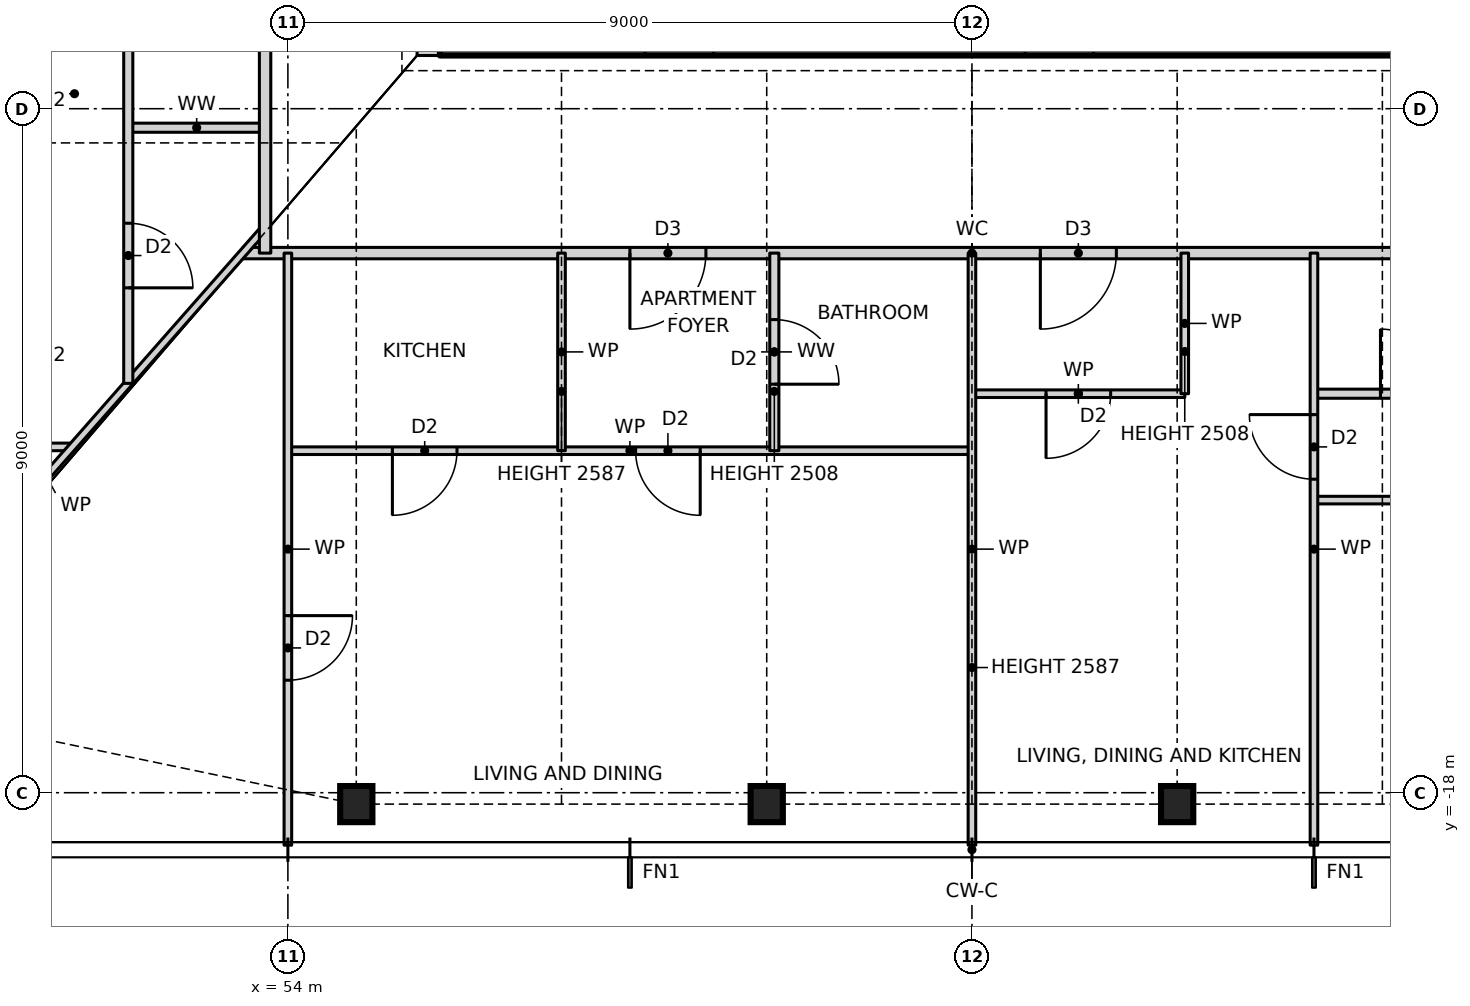
"""IFC4 building model, lengths in metres.
Left out: names, types, materials, properties, quantities, classifications, styles, units other than length and angle.
Written with IfcOpenShell. Run it as: python <this file> out.ifc"""

import sys

from ifc_helpers import new_model, si_unit, direction, frame, frame_2d, origin, origin_2d, place, context, subcontext, project, spatial, rectangle, i_section, extrude, element, fill, save


model = new_model("IFC4")
c1 = context("Model", 3, precision=1e-05, world=origin(), true_north=direction((0.0, 1.0)))
c2 = subcontext(c1, "Body", "Model", "MODEL_VIEW")
j1 = project(units=[si_unit("LENGTHUNIT", "METRE"), si_unit("PLANEANGLEUNIT", "RADIAN")], contexts=[c1])
p1 = place(None, origin())
s1 = spatial("IfcSite", under=j1, at=p1, CompositionType="ELEMENT")
p2 = place(p1, origin())
s2 = spatial("IfcBuilding", under=s1, at=p2, CompositionType="ELEMENT")
p3 = place(p2, frame((0.0, 0.0, 57.0)))
s3 = spatial("IfcBuildingStorey", under=s2, at=p3, CompositionType="ELEMENT", Elevation=57.0)
for number, where, z_axis, x_axis in (
    (1, (54.9, -18.15, 0.0), (0.0, 0.0, 1.0), (1.0, 0.0, 0.0)),
    (2, (60.3, -18.15, 0.0), (0.0, 0.0, 1.0), (1.0, 0.0, 0.0)),
    (3, (65.7, -18.15, 0.0), (0.0, 0.0, 1.0), (1.0, 0.0, 0.0)),
):
    element("IfcColumn", number, at=place(p3, frame(where, z_axis=z_axis, x_axis=x_axis)), inside=s3, PredefinedType="COLUMN", context=c2, shape_type="SweptSolid", body=[
        extrude(i_section(OverallWidth=0.424, OverallDepth=0.475, WebThickness=0.048, FlangeThickness=0.077, at=origin_2d()), origin(), (0.0, 0.0, 1.0), 3.5),
    ])
p4 = place(p3, frame((55.7, -8.15, 0.0), z_axis=(0.0, 0.0, 1.0), x_axis=(1.0, 0.0, 0.0)))
e4 = element("IfcWall", 4, at=p4, inside=s3, PredefinedType="SOLIDWALL", context=c2, shape_type="SweptSolid", body=[
    extrude(rectangle(XDim=0.3, YDim=0.3, at=frame_2d((0.15, 0.0))), origin(), (0.0, 0.0, 1.0), 3.5),
])
p5 = place(p3, frame((56.0, -8.0, 0.0), z_axis=(0.0, 0.0, 1.0), x_axis=(1.0, 0.0, 0.0)))
e5 = element("IfcWall", 5, at=p5, inside=s3, PredefinedType="SHEAR", context=c2, shape_type="SweptSolid", body=[
    extrude(rectangle(XDim=14.0, YDim=0.6, at=frame_2d((7.0, 0.0))), origin(), (0.0, 0.0, 1.0), 3.5),
])
p6 = place(p5, frame((2.7, 0.0, 0.0)))
e6 = element("IfcOpeningElement", 6, at=p6, cuts=e5, PredefinedType="OPENING", context=c2, shape_type="SweptSolid", body=[
    extrude(rectangle(XDim=0.9, YDim=2.1, at=frame_2d((0.45, 1.05))), frame((0.0, 0.31, 0.0), z_axis=(0.0, -1.0, 0.0), x_axis=(1.0, 0.0, 0.0)), (0.0, 0.0, 1.0), 0.62),
])
p7 = place(p5, frame((7.7, 0.0, 0.0)))
e7 = element("IfcOpeningElement", 7, at=p7, cuts=e5, PredefinedType="OPENING", context=c2, shape_type="SweptSolid", body=[
    extrude(rectangle(XDim=0.9, YDim=2.1, at=frame_2d((0.45, 1.05))), frame((0.0, 0.31, 0.0), z_axis=(0.0, -1.0, 0.0), x_axis=(1.0, 0.0, 0.0)), (0.0, 0.0, 1.0), 0.62),
])
p8 = place(p3, frame((67.5, -14.15, 0.0), z_axis=(0.0, 0.0, 1.0), x_axis=(1.0, 0.0, 0.0)))
e8 = element("IfcWall", 8, at=p8, inside=s3, PredefinedType="PARTITIONING", context=c2, shape_type="SweptSolid", body=[
    extrude(rectangle(XDim=6.7, YDim=0.1, at=frame_2d((3.35, 0.0))), origin(), (0.0, 0.0, 1.0), 3.27),
])
p9 = place(p8, frame((1.825, 0.0, 0.0)))
e9 = element("IfcOpeningElement", 9, at=p9, cuts=e8, PredefinedType="OPENING", context=c2, shape_type="SweptSolid", body=[
    extrude(rectangle(XDim=0.85, YDim=2.1, at=frame_2d((0.425, 1.05))), frame((0.0, 0.06, 0.0), z_axis=(0.0, -1.0, 0.0), x_axis=(1.0, 0.0, 0.0)), (0.0, 0.0, 1.0), 0.12),
])
p10 = place(p8, frame((5.175, 0.0, 0.0)))
e10 = element("IfcOpeningElement", 10, at=p10, cuts=e8, PredefinedType="OPENING", context=c2, shape_type="SweptSolid", body=[
    extrude(rectangle(XDim=0.85, YDim=2.1, at=frame_2d((0.425, 1.05))), frame((0.0, 0.06, 0.0), z_axis=(0.0, -1.0, 0.0), x_axis=(1.0, 0.0, 0.0)), (0.0, 0.0, 1.0), 0.12),
])
p11 = place(p3, frame((54.0, -13.5, 0.0), z_axis=(0.0, 0.0, 1.0), x_axis=(1.0, 0.0, 0.0)))
e11 = element("IfcWall", 11, at=p11, inside=s3, PredefinedType="PARTITIONING", context=c2, shape_type="SweptSolid", body=[
    extrude(rectangle(XDim=9.0, YDim=0.1, at=frame_2d((4.5, 0.0))), origin(), (0.0, 0.0, 1.0), 3.27),
])
p12 = place(p11, frame((1.375, 0.0, 0.0)))
e12 = element("IfcOpeningElement", 12, at=p12, cuts=e11, PredefinedType="OPENING", context=c2, shape_type="SweptSolid", body=[
    extrude(rectangle(XDim=0.85, YDim=2.1, at=frame_2d((0.425, 1.05))), frame((0.0, 0.06, 0.0), z_axis=(0.0, -1.0, 0.0), x_axis=(1.0, 0.0, 0.0)), (0.0, 0.0, 1.0), 0.12),
])
p13 = place(p11, frame((4.575, 0.0, 0.0)))
e13 = element("IfcOpeningElement", 13, at=p13, cuts=e11, PredefinedType="OPENING", context=c2, shape_type="SweptSolid", body=[
    extrude(rectangle(XDim=0.85, YDim=2.1, at=frame_2d((0.425, 1.05))), frame((0.0, 0.06, 0.0), z_axis=(0.0, -1.0, 0.0), x_axis=(1.0, 0.0, 0.0)), (0.0, 0.0, 1.0), 0.12),
])
p14 = place(p3, frame((50.5, -13.45, 0.0), z_axis=(0.0, 0.0, 1.0), x_axis=(1.0, 0.0, 0.0)))
e14 = element("IfcWall", 14, at=p14, inside=s3, PredefinedType="PARTITIONING", context=c2, shape_type="SweptSolid", body=[
    extrude(rectangle(XDim=0.664, YDim=0.1, at=frame_2d((0.332, 0.0))), origin(), (0.0, 0.0, 1.0), 3.27),
])
p15 = place(p3, frame((63.0, -12.75, 0.0), z_axis=(0.0, 0.0, 1.0), x_axis=(1.0, 0.0, 0.0)))
e15 = element("IfcWall", 15, at=p15, inside=s3, PredefinedType="PARTITIONING", context=c2, shape_type="SweptSolid", body=[
    extrude(rectangle(XDim=2.8, YDim=0.1, at=frame_2d((1.4, 0.0))), origin(), (0.0, 0.0, 1.0), 3.27),
])
p16 = place(p15, frame((0.975, 0.0, 0.0)))
e16 = element("IfcOpeningElement", 16, at=p16, cuts=e15, PredefinedType="OPENING", context=c2, shape_type="SweptSolid", body=[
    extrude(rectangle(XDim=0.85, YDim=2.1, at=frame_2d((0.425, 1.05))), frame((0.0, 0.06, 0.0), z_axis=(0.0, -1.0, 0.0), x_axis=(1.0, 0.0, 0.0)), (0.0, 0.0, 1.0), 0.12),
])
p17 = place(p3, frame((67.5, -12.75, 0.0), z_axis=(0.0, 0.0, 1.0), x_axis=(1.0, 0.0, 0.0)))
e17 = element("IfcWall", 17, at=p17, inside=s3, PredefinedType="PARTITIONING", context=c2, shape_type="SweptSolid", body=[
    extrude(rectangle(XDim=6.7, YDim=0.12, at=frame_2d((3.35, 0.0))), origin(), (0.0, 0.0, 1.0), 3.27),
])
p18 = place(p17, frame((0.875, 0.0, 0.0)))
e18 = element("IfcOpeningElement", 18, at=p18, cuts=e17, PredefinedType="OPENING", context=c2, shape_type="SweptSolid", body=[
    extrude(rectangle(XDim=0.85, YDim=2.1, at=frame_2d((0.425, 1.05))), frame((0.0, 0.07, 0.0), z_axis=(0.0, -1.0, 0.0), x_axis=(1.0, 0.0, 0.0)), (0.0, 0.0, 1.0), 0.14),
])
p19 = place(p17, frame((4.225, 0.0, 0.0)))
e19 = element("IfcOpeningElement", 19, at=p19, cuts=e17, PredefinedType="OPENING", context=c2, shape_type="SweptSolid", body=[
    extrude(rectangle(XDim=0.85, YDim=2.1, at=frame_2d((0.425, 1.05))), frame((0.0, 0.07, 0.0), z_axis=(0.0, -1.0, 0.0), x_axis=(1.0, 0.0, 0.0)), (0.0, 0.0, 1.0), 0.14),
])
p20 = place(p3, frame((53.408, -10.9, 0.0), z_axis=(0.0, 0.0, 1.0), x_axis=(1.0, 0.0, 0.0)))
e20 = element("IfcWall", 20, at=p20, inside=s3, PredefinedType="PARTITIONING", context=c2, shape_type="SweptSolid", body=[
    extrude(rectangle(XDim=19.184, YDim=0.15, at=frame_2d((9.592, 0.0))), origin(), (0.0, 0.0, 1.0), 3.27),
])
p21 = place(p20, frame((5.092, 0.0, 0.0)))
e21 = element("IfcOpeningElement", 21, at=p21, cuts=e20, PredefinedType="OPENING", context=c2, shape_type="SweptSolid", body=[
    extrude(rectangle(XDim=1.0, YDim=2.1, at=frame_2d((0.5, 1.05))), frame((0.0, 0.085, 0.0), z_axis=(0.0, -1.0, 0.0), x_axis=(1.0, 0.0, 0.0)), (0.0, 0.0, 1.0), 0.17),
])
p22 = place(p20, frame((10.492, 0.0, 0.0)))
e22 = element("IfcOpeningElement", 22, at=p22, cuts=e20, PredefinedType="OPENING", context=c2, shape_type="SweptSolid", body=[
    extrude(rectangle(XDim=1.0, YDim=2.1, at=frame_2d((0.5, 1.05))), frame((0.0, 0.085, 0.0), z_axis=(0.0, -1.0, 0.0), x_axis=(1.0, 0.0, 0.0)), (0.0, 0.0, 1.0), 0.17),
])
p23 = place(p3, frame((51.9, -9.25, 0.0), z_axis=(0.0, 0.0, 1.0), x_axis=(1.0, 0.0, 0.0)))
e23 = element("IfcWall", 23, at=p23, inside=s3, PredefinedType="PARTITIONING", context=c2, shape_type="SweptSolid", body=[
    extrude(rectangle(XDim=1.8, YDim=0.12, at=frame_2d((0.9, 0.0))), origin(), (0.0, 0.0, 1.0), 3.27),
])
p24 = place(p3, frame((47.944, -17.109, 0.0), z_axis=(0.0, 0.0, 1.0), x_axis=(0.660612734851, 0.750726857487, 0.0)))
e24 = element("IfcWall", 24, at=p24, inside=s3, PredefinedType="PARTITIONING", context=c2, shape_type="SweptSolid", body=[
    extrude(rectangle(XDim=8.713, YDim=0.1, at=frame_2d((4.356, 0.0))), origin(), (0.0, 0.0, 1.0), 2.429),
])
p25 = place(p3, frame((67.5, -18.69, 0.0), z_axis=(0.0, 0.0, 1.0), x_axis=(0.0, 1.0, 0.0)))
e25 = element("IfcWall", 25, at=p25, inside=s3, PredefinedType="PARTITIONING", context=c2, shape_type="SweptSolid", body=[
    extrude(rectangle(XDim=7.79, YDim=0.1, at=frame_2d((3.895, 0.0))), origin(), (0.0, 0.0, 1.0), 3.27),
])
p26 = place(p25, frame((4.815, 0.0, 0.0)))
e26 = element("IfcOpeningElement", 26, at=p26, cuts=e25, PredefinedType="OPENING", context=c2, shape_type="SweptSolid", body=[
    extrude(rectangle(XDim=0.85, YDim=2.1, at=frame_2d((0.425, 1.05))), frame((0.0, 0.06, 0.0), z_axis=(0.0, -1.0, 0.0), x_axis=(1.0, 0.0, 0.0)), (0.0, 0.0, 1.0), 0.12),
])
p27 = place(p3, frame((65.8, -12.75, 0.0), z_axis=(0.0, 0.0, 1.0), x_axis=(0.0, 1.0, 0.0)))
e27 = element("IfcWall", 27, at=p27, inside=s3, PredefinedType="PARTITIONING", context=c2, shape_type="SweptSolid", body=[
    extrude(rectangle(XDim=1.85, YDim=0.1, at=frame_2d((0.925, 0.0))), origin(), (0.0, 0.0, 1.0), 2.508),
])
p28 = place(p3, frame((63.0, -18.69, 0.0), z_axis=(0.0, 0.0, 1.0), x_axis=(0.0, 1.0, 0.0)))
e28 = element("IfcWall", 28, at=p28, inside=s3, PredefinedType="PARTITIONING", context=c2, shape_type="SweptSolid", body=[
    extrude(rectangle(XDim=7.79, YDim=0.1, at=frame_2d((3.895, 0.0))), origin(), (0.0, 0.0, 1.0), 2.587),
])
p29 = place(p3, frame((60.4, -13.5, 0.0), z_axis=(0.0, 0.0, 1.0), x_axis=(0.0, 1.0, 0.0)))
e29 = element("IfcWall", 29, at=p29, inside=s3, PredefinedType="PARTITIONING", context=c2, shape_type="SweptSolid", body=[
    extrude(rectangle(XDim=2.6, YDim=0.12, at=frame_2d((1.3, 0.0))), origin(), (0.0, 0.0, 1.0), 2.508),
])
p30 = place(p29, frame((0.875, 0.0, 0.0)))
e30 = element("IfcOpeningElement", 30, at=p30, cuts=e29, PredefinedType="OPENING", context=c2, shape_type="SweptSolid", body=[
    extrude(rectangle(XDim=0.85, YDim=2.1, at=frame_2d((0.425, 1.05))), frame((0.0, 0.07, 0.0), z_axis=(0.0, -1.0, 0.0), x_axis=(1.0, 0.0, 0.0)), (0.0, 0.0, 1.0), 0.14),
])
p31 = place(p3, frame((57.6, -13.5, 0.0), z_axis=(0.0, 0.0, 1.0), x_axis=(0.0, 1.0, 0.0)))
e31 = element("IfcWall", 31, at=p31, inside=s3, PredefinedType="PARTITIONING", context=c2, shape_type="SweptSolid", body=[
    extrude(rectangle(XDim=2.6, YDim=0.1, at=frame_2d((1.3, 0.0))), origin(), (0.0, 0.0, 1.0), 2.587),
])
p32 = place(p3, frame((54.0, -18.69, 0.0), z_axis=(0.0, 0.0, 1.0), x_axis=(0.0, 1.0, 0.0)))
e32 = element("IfcWall", 32, at=p32, inside=s3, PredefinedType="PARTITIONING", context=c2, shape_type="SweptSolid", body=[
    extrude(rectangle(XDim=7.79, YDim=0.1, at=frame_2d((3.895, 0.0))), origin(), (0.0, 0.0, 1.0), 3.27),
])
p33 = place(p32, frame((2.17, 0.0, 0.0)))
e33 = element("IfcOpeningElement", 33, at=p33, cuts=e32, PredefinedType="OPENING", context=c2, shape_type="SweptSolid", body=[
    extrude(rectangle(XDim=0.85, YDim=2.1, at=frame_2d((0.425, 1.05))), frame((0.0, 0.06, 0.0), z_axis=(0.0, -1.0, 0.0), x_axis=(1.0, 0.0, 0.0)), (0.0, 0.0, 1.0), 0.12),
])
p34 = place(p3, frame((53.7, -10.9, 0.0), z_axis=(0.0, 0.0, 1.0), x_axis=(0.0, 1.0, 0.0)))
e34 = element("IfcWall", 34, at=p34, inside=s3, PredefinedType="PARTITIONING", context=c2, shape_type="SweptSolid", body=[
    extrude(rectangle(XDim=21.468, YDim=0.15, at=frame_2d((10.734, 0.0))), origin(), (0.0, 0.0, 1.0), 3.27),
])
p35 = place(p34, frame((16.65, 0.0, 0.0)))
e35 = element("IfcOpeningElement", 35, at=p35, cuts=e34, PredefinedType="OPENING", context=c2, shape_type="SweptSolid", body=[
    extrude(rectangle(XDim=1.0, YDim=2.1, at=frame_2d((0.5, 1.05))), frame((0.0, 0.085, 0.0), z_axis=(0.0, -1.0, 0.0), x_axis=(1.0, 0.0, 0.0)), (0.0, 0.0, 1.0), 0.17),
])
p36 = place(p34, frame((11.25, 0.0, 0.0)))
e36 = element("IfcOpeningElement", 36, at=p36, cuts=e34, PredefinedType="OPENING", context=c2, shape_type="SweptSolid", body=[
    extrude(rectangle(XDim=1.0, YDim=2.1, at=frame_2d((0.5, 1.05))), frame((0.0, 0.085, 0.0), z_axis=(0.0, -1.0, 0.0), x_axis=(1.0, 0.0, 0.0)), (0.0, 0.0, 1.0), 0.17),
])
p37 = place(p3, frame((51.9, -12.614, 0.0), z_axis=(0.0, 0.0, 1.0), x_axis=(0.0, 1.0, 0.0)))
e37 = element("IfcWall", 37, at=p37, inside=s3, PredefinedType="PARTITIONING", context=c2, shape_type="SweptSolid", body=[
    extrude(rectangle(XDim=10.364, YDim=0.12, at=frame_2d((5.182, 0.0))), origin(), (0.0, 0.0, 1.0), 3.27),
])
p38 = place(p37, frame((8.639, 0.0, 0.0)))
e38 = element("IfcOpeningElement", 38, at=p38, cuts=e37, PredefinedType="OPENING", context=c2, shape_type="SweptSolid", body=[
    extrude(rectangle(XDim=0.85, YDim=2.1, at=frame_2d((0.425, 1.05))), frame((0.0, 0.07, 0.0), z_axis=(0.0, -1.0, 0.0), x_axis=(1.0, 0.0, 0.0)), (0.0, 0.0, 1.0), 0.14),
])
p39 = place(p37, frame((5.139, 0.0, 0.0)))
e39 = element("IfcOpeningElement", 39, at=p39, cuts=e37, PredefinedType="OPENING", context=c2, shape_type="SweptSolid", body=[
    extrude(rectangle(XDim=0.85, YDim=2.1, at=frame_2d((0.425, 1.05))), frame((0.0, 0.07, 0.0), z_axis=(0.0, -1.0, 0.0), x_axis=(1.0, 0.0, 0.0)), (0.0, 0.0, 1.0), 0.14),
])
p40 = place(p37, frame((1.257, 0.0, 0.0)))
e40 = element("IfcOpeningElement", 40, at=p40, cuts=e37, PredefinedType="OPENING", context=c2, shape_type="SweptSolid", body=[
    extrude(rectangle(XDim=0.85, YDim=2.1, at=frame_2d((0.425, 1.05))), frame((0.0, 0.07, 0.0), z_axis=(0.0, -1.0, 0.0), x_axis=(1.0, 0.0, 0.0)), (0.0, 0.0, 1.0), 0.14),
])
p41 = place(p12, frame((0.85, 0.0, 0.0), z_axis=(0.0, 0.0, 1.0), x_axis=(-1.0, 0.0, 0.0)))
e41 = element("IfcDoor", 41, at=p41, inside=s3, OperationType="SINGLE_SWING_RIGHT", PredefinedType="DOOR", context=c2, shape_type="SweptSolid", body=[
    extrude(rectangle(XDim=0.85, YDim=2.1, at=frame_2d((0.425, 1.05))), frame((0.0, 0.025, 0.0), z_axis=(0.0, -1.0, 0.0), x_axis=(1.0, 0.0, 0.0)), (0.0, 0.0, 1.0), 0.05),
])
fill(e12, e41)
p42 = place(p21, frame((1.0, 0.0, 0.0), z_axis=(0.0, 0.0, 1.0), x_axis=(-1.0, 0.0, 0.0)))
e42 = element("IfcDoor", 42, at=p42, inside=s3, OperationType="SINGLE_SWING_RIGHT", PredefinedType="DOOR", context=c2, shape_type="SweptSolid", body=[
    extrude(rectangle(XDim=1.0, YDim=2.1, at=frame_2d((0.5, 1.05))), frame((0.0, 0.025, 0.0), z_axis=(0.0, -1.0, 0.0), x_axis=(1.0, 0.0, 0.0)), (0.0, 0.0, 1.0), 0.05),
])
fill(e21, e42)
p43 = place(p13, frame((0.85, 0.0, 0.0), z_axis=(0.0, 0.0, 1.0), x_axis=(-1.0, 0.0, 0.0)))
e43 = element("IfcDoor", 43, at=p43, inside=s3, OperationType="SINGLE_SWING_LEFT", PredefinedType="DOOR", context=c2, shape_type="SweptSolid", body=[
    extrude(rectangle(XDim=0.85, YDim=2.1, at=frame_2d((0.425, 1.05))), frame((0.0, 0.025, 0.0), z_axis=(0.0, -1.0, 0.0), x_axis=(1.0, 0.0, 0.0)), (0.0, 0.0, 1.0), 0.05),
])
fill(e13, e43)
p44 = place(p30, frame((0.85, 0.0, 0.0), z_axis=(0.0, 0.0, 1.0), x_axis=(-1.0, 0.0, 0.0)))
e44 = element("IfcDoor", 44, at=p44, inside=s3, OperationType="SINGLE_SWING_RIGHT", PredefinedType="DOOR", context=c2, shape_type="SweptSolid", body=[
    extrude(rectangle(XDim=0.85, YDim=2.1, at=frame_2d((0.425, 1.05))), frame((0.0, 0.025, 0.0), z_axis=(0.0, -1.0, 0.0), x_axis=(1.0, 0.0, 0.0)), (0.0, 0.0, 1.0), 0.05),
])
fill(e30, e44)
p45 = place(p33, frame((0.85, 0.0, 0.0), z_axis=(0.0, 0.0, 1.0), x_axis=(-1.0, 0.0, 0.0)))
e45 = element("IfcDoor", 45, at=p45, inside=s3, OperationType="SINGLE_SWING_LEFT", PredefinedType="DOOR", context=c2, shape_type="SweptSolid", body=[
    extrude(rectangle(XDim=0.85, YDim=2.1, at=frame_2d((0.425, 1.05))), frame((0.0, 0.025, 0.0), z_axis=(0.0, -1.0, 0.0), x_axis=(1.0, 0.0, 0.0)), (0.0, 0.0, 1.0), 0.05),
])
fill(e33, e45)
p46 = place(p22, frame((1.0, 0.0, 0.0), z_axis=(0.0, 0.0, 1.0), x_axis=(-1.0, 0.0, 0.0)))
e46 = element("IfcDoor", 46, at=p46, inside=s3, OperationType="SINGLE_SWING_RIGHT", PredefinedType="DOOR", context=c2, shape_type="SweptSolid", body=[
    extrude(rectangle(XDim=1.0, YDim=2.1, at=frame_2d((0.5, 1.05))), frame((0.0, 0.025, 0.0), z_axis=(0.0, -1.0, 0.0), x_axis=(1.0, 0.0, 0.0)), (0.0, 0.0, 1.0), 0.05),
])
fill(e22, e46)
p47 = place(p16, frame((0.85, 0.0, 0.0), z_axis=(0.0, 0.0, 1.0), x_axis=(-1.0, 0.0, 0.0)))
e47 = element("IfcDoor", 47, at=p47, inside=s3, OperationType="SINGLE_SWING_RIGHT", PredefinedType="DOOR", context=c2, shape_type="SweptSolid", body=[
    extrude(rectangle(XDim=0.85, YDim=2.1, at=frame_2d((0.425, 1.05))), frame((0.0, 0.025, 0.0), z_axis=(0.0, -1.0, 0.0), x_axis=(1.0, 0.0, 0.0)), (0.0, 0.0, 1.0), 0.05),
])
fill(e16, e47)
p48 = place(p26, origin())
e48 = element("IfcDoor", 48, at=p48, inside=s3, OperationType="SINGLE_SWING_RIGHT", PredefinedType="DOOR", context=c2, shape_type="SweptSolid", body=[
    extrude(rectangle(XDim=0.85, YDim=2.1, at=frame_2d((0.425, 1.05))), frame((0.0, 0.025, 0.0), z_axis=(0.0, -1.0, 0.0), x_axis=(1.0, 0.0, 0.0)), (0.0, 0.0, 1.0), 0.05),
])
fill(e26, e48)
p49 = place(p18, origin())
e49 = element("IfcDoor", 49, at=p49, inside=s3, OperationType="SINGLE_SWING_LEFT", PredefinedType="DOOR", context=c2, shape_type="SweptSolid", body=[
    extrude(rectangle(XDim=0.85, YDim=2.1, at=frame_2d((0.425, 1.05))), frame((0.0, 0.025, 0.0), z_axis=(0.0, -1.0, 0.0), x_axis=(1.0, 0.0, 0.0)), (0.0, 0.0, 1.0), 0.05),
])
fill(e18, e49)
p50 = place(p40, frame((0.85, 0.0, 0.0), z_axis=(0.0, 0.0, 1.0), x_axis=(-1.0, 0.0, 0.0)))
e50 = element("IfcDoor", 50, at=p50, inside=s3, OperationType="SINGLE_SWING_RIGHT", PredefinedType="DOOR", context=c2, shape_type="SweptSolid", body=[
    extrude(rectangle(XDim=0.85, YDim=2.1, at=frame_2d((0.425, 1.05))), frame((0.0, 0.025, 0.0), z_axis=(0.0, -1.0, 0.0), x_axis=(1.0, 0.0, 0.0)), (0.0, 0.0, 1.0), 0.05),
])
fill(e40, e50)
save(model, sys.argv[1])
